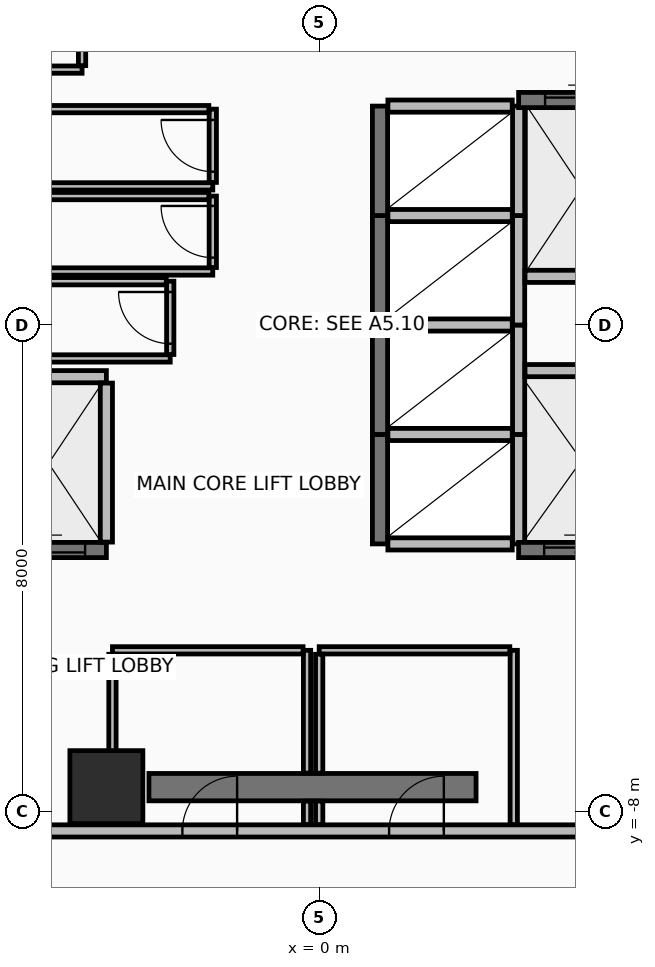
"""IFC4 building model, lengths in metres.
Left out: names, types, materials, properties, quantities, classifications, styles, units other than length and angle.
Written with IfcOpenShell. Run it as: python <this file> out.ifc"""

import sys

from ifc_helpers import new_model, si_unit, direction, frame, frame_2d, origin, origin_2d, place, context, subcontext, project, spatial, rectangle, extrude, element, fill, save


model = new_model("IFC4")
c1 = context("Model", 3, precision=1e-05, world=origin(), true_north=direction((0.0, 1.0)))
c2 = subcontext(c1, "Body", "Model", "MODEL_VIEW")
j1 = project(units=[si_unit("LENGTHUNIT", "METRE"), si_unit("PLANEANGLEUNIT", "RADIAN")], contexts=[c1])
p1 = place(None, origin())
s1 = spatial("IfcSite", under=j1, at=p1, CompositionType="ELEMENT")
p2 = place(p1, origin())
s2 = spatial("IfcBuilding", under=s1, at=p2, CompositionType="ELEMENT")
p3 = place(p2, frame((0.0, 0.0, 196.85)))
s3 = spatial("IfcBuildingStorey", under=s2, at=p3, CompositionType="ELEMENT", Elevation=196.85)
p4 = place(p3, frame((-3.5, -7.6, 0.0), z_axis=(0.0, 0.0, 1.0), x_axis=(1.0, 0.0, 0.0)))
e1 = element("IfcColumn", 1, at=p4, inside=s3, PredefinedType="COLUMN", context=c2, shape_type="SweptSolid", body=[
    extrude(rectangle(XDim=1.2, YDim=1.2, at=origin_2d()), origin(), (0.0, 0.0, 1.0), 3.6),
])
p5 = place(p3, frame((-2.8, -7.6, 0.0), z_axis=(0.0, 0.0, 1.0), x_axis=(1.0, 0.0, 0.0)))
e2 = element("IfcWall", 2, at=p5, inside=s3, PredefinedType="SHEAR", context=c2, shape_type="SweptSolid", body=[
    extrude(rectangle(XDim=5.38, YDim=0.45, at=frame_2d((2.69, 0.0))), origin(), (0.0, 0.0, 1.0), 3.42),
])
p6 = place(p3, frame((-9.62, -8.32, 0.0), z_axis=(0.0, 0.0, 1.0), x_axis=(1.0, 0.0, 0.0)))
e3 = element("IfcWall", 3, at=p6, inside=s3, PredefinedType="PARTITIONING", context=c2, shape_type="SweptSolid", body=[
    extrude(rectangle(XDim=19.24, YDim=0.2, at=frame_2d((9.62, 0.0))), origin(), (0.0, 0.0, 1.0), 2.865),
])
p7 = place(p6, frame((7.37, 0.0, 0.0)))
e4 = element("IfcOpeningElement", 4, at=p7, cuts=e3, PredefinedType="OPENING", context=c2, shape_type="SweptSolid", body=[
    extrude(rectangle(XDim=0.9, YDim=2.1, at=frame_2d((0.45, 1.05))), frame((0.0, 0.11, 0.0), z_axis=(0.0, -1.0, 0.0), x_axis=(1.0, 0.0, 0.0)), (0.0, 0.0, 1.0), 0.22),
])
p8 = place(p6, frame((10.77, 0.0, 0.0)))
e5 = element("IfcOpeningElement", 5, at=p8, cuts=e3, PredefinedType="OPENING", context=c2, shape_type="SweptSolid", body=[
    extrude(rectangle(XDim=0.9, YDim=2.1, at=frame_2d((0.45, 1.05))), frame((0.0, 0.11, 0.0), z_axis=(0.0, -1.0, 0.0), x_axis=(1.0, 0.0, 0.0)), (0.0, 0.0, 1.0), 0.22),
])
p9 = place(p3, frame((1.0, -3.6, 0.0), z_axis=(0.0, 0.0, 1.0), x_axis=(0.0, 1.0, 0.0)))
e6 = element("IfcWall", 6, at=p9, inside=s3, PredefinedType="SHEAR", context=c2, shape_type="SweptSolid", body=[
    extrude(rectangle(XDim=1.8, YDim=0.25, at=frame_2d((0.9, 0.0))), origin(), (0.0, 0.0, 1.0), 3.42),
])
p10 = place(p3, frame((3.28, -3.6, 0.0), z_axis=(0.0, 0.0, 1.0), x_axis=(0.0, 1.0, 0.0)))
e7 = element("IfcWall", 7, at=p10, inside=s3, PredefinedType="PARTITIONING", context=c2, shape_type="SweptSolid", body=[
    extrude(rectangle(XDim=1.8, YDim=0.2, at=frame_2d((0.9, 0.0))), origin(), (0.0, 0.0, 1.0), 3.42),
])
for number, where, z_axis, x_axis in (
    (8, (1.13, -3.6, 0.0), (0.0, 0.0, 1.0), (1.0, 0.0, 0.0)),
    (9, (1.13, -1.8, 0.0), (0.0, 0.0, 1.0), (1.0, 0.0, 0.0)),
):
    element("IfcWall", number, at=place(p3, frame(where, z_axis=z_axis, x_axis=x_axis)), inside=s3, PredefinedType="PARTITIONING", context=c2, shape_type="SweptSolid", body=[
        extrude(rectangle(XDim=2.045, YDim=0.2, at=frame_2d((1.022, 0.0))), origin(), (0.0, 0.0, 1.0), 3.42),
    ])
p11 = place(p3, frame((1.0, -1.8, 0.0), z_axis=(0.0, 0.0, 1.0), x_axis=(0.0, 1.0, 0.0)))
e10 = element("IfcWall", 10, at=p11, inside=s3, PredefinedType="SHEAR", context=c2, shape_type="SweptSolid", body=[
    extrude(rectangle(XDim=1.8, YDim=0.25, at=frame_2d((0.9, 0.0))), origin(), (0.0, 0.0, 1.0), 3.42),
])
p12 = place(p3, frame((3.28, -1.8, 0.0), z_axis=(0.0, 0.0, 1.0), x_axis=(0.0, 1.0, 0.0)))
e11 = element("IfcWall", 11, at=p12, inside=s3, PredefinedType="PARTITIONING", context=c2, shape_type="SweptSolid", body=[
    extrude(rectangle(XDim=1.8, YDim=0.2, at=frame_2d((0.9, 0.0))), origin(), (0.0, 0.0, 1.0), 3.42),
])
p13 = place(p3, frame((1.13, 0.0, 0.0), z_axis=(0.0, 0.0, 1.0), x_axis=(1.0, 0.0, 0.0)))
e12 = element("IfcWall", 12, at=p13, inside=s3, PredefinedType="PARTITIONING", context=c2, shape_type="SweptSolid", body=[
    extrude(rectangle(XDim=2.045, YDim=0.2, at=frame_2d((1.022, 0.0))), origin(), (0.0, 0.0, 1.0), 3.42),
])
p14 = place(p3, frame((1.0, 0.0, 0.0), z_axis=(0.0, 0.0, 1.0), x_axis=(0.0, 1.0, 0.0)))
e13 = element("IfcWall", 13, at=p14, inside=s3, PredefinedType="SHEAR", context=c2, shape_type="SweptSolid", body=[
    extrude(rectangle(XDim=1.8, YDim=0.25, at=frame_2d((0.9, 0.0))), origin(), (0.0, 0.0, 1.0), 3.42),
])
p15 = place(p3, frame((3.28, 0.0, 0.0), z_axis=(0.0, 0.0, 1.0), x_axis=(0.0, 1.0, 0.0)))
e14 = element("IfcWall", 14, at=p15, inside=s3, PredefinedType="PARTITIONING", context=c2, shape_type="SweptSolid", body=[
    extrude(rectangle(XDim=1.8, YDim=0.2, at=frame_2d((0.9, 0.0))), origin(), (0.0, 0.0, 1.0), 3.42),
])
p16 = place(p3, frame((1.13, 1.8, 0.0), z_axis=(0.0, 0.0, 1.0), x_axis=(1.0, 0.0, 0.0)))
e15 = element("IfcWall", 15, at=p16, inside=s3, PredefinedType="PARTITIONING", context=c2, shape_type="SweptSolid", body=[
    extrude(rectangle(XDim=2.045, YDim=0.2, at=frame_2d((1.022, 0.0))), origin(), (0.0, 0.0, 1.0), 3.42),
])
p17 = place(p3, frame((1.0, 1.8, 0.0), z_axis=(0.0, 0.0, 1.0), x_axis=(0.0, 1.0, 0.0)))
e16 = element("IfcWall", 16, at=p17, inside=s3, PredefinedType="SHEAR", context=c2, shape_type="SweptSolid", body=[
    extrude(rectangle(XDim=1.8, YDim=0.25, at=frame_2d((0.9, 0.0))), origin(), (0.0, 0.0, 1.0), 3.42),
])
p18 = place(p3, frame((3.28, 1.8, 0.0), z_axis=(0.0, 0.0, 1.0), x_axis=(0.0, 1.0, 0.0)))
e17 = element("IfcWall", 17, at=p18, inside=s3, PredefinedType="PARTITIONING", context=c2, shape_type="SweptSolid", body=[
    extrude(rectangle(XDim=1.8, YDim=0.2, at=frame_2d((0.9, 0.0))), origin(), (0.0, 0.0, 1.0), 3.42),
])
p19 = place(p3, frame((1.13, 3.6, 0.0), z_axis=(0.0, 0.0, 1.0), x_axis=(1.0, 0.0, 0.0)))
e18 = element("IfcWall", 18, at=p19, inside=s3, PredefinedType="PARTITIONING", context=c2, shape_type="SweptSolid", body=[
    extrude(rectangle(XDim=2.045, YDim=0.2, at=frame_2d((1.022, 0.0))), origin(), (0.0, 0.0, 1.0), 2.715),
])
p20 = place(p3, frame((-5.4, -3.7, 0.0), z_axis=(0.0, 0.0, 1.0), x_axis=(1.0, 0.0, 0.0)))
e19 = element("IfcWall", 19, at=p20, inside=s3, PredefinedType="SHEAR", context=c2, shape_type="SweptSolid", body=[
    extrude(rectangle(XDim=1.9, YDim=0.25, at=frame_2d((0.95, 0.0))), origin(), (0.0, 0.0, 1.0), 3.42),
])
p21 = place(p20, frame((0.35, 0.0, 0.0)))
e20 = element("IfcOpeningElement", 20, at=p21, cuts=e19, PredefinedType="OPENING", context=c2, shape_type="SweptSolid", body=[
    extrude(rectangle(XDim=1.2, YDim=2.2, at=frame_2d((0.6, 1.1))), frame((0.0, 0.135, 0.0), z_axis=(0.0, -1.0, 0.0), x_axis=(1.0, 0.0, 0.0)), (0.0, 0.0, 1.0), 0.27),
])
p22 = place(p3, frame((-5.27, -0.85, 0.0), z_axis=(0.0, 0.0, 1.0), x_axis=(1.0, 0.0, 0.0)))
e21 = element("IfcWall", 21, at=p22, inside=s3, PredefinedType="PARTITIONING", context=c2, shape_type="SweptSolid", body=[
    extrude(rectangle(XDim=1.77, YDim=0.2, at=frame_2d((0.885, 0.0))), origin(), (0.0, 0.0, 1.0), 3.42),
])
p23 = place(p3, frame((-3.5, -3.57, 0.0), z_axis=(0.0, 0.0, 1.0), x_axis=(0.0, 1.0, 0.0)))
e22 = element("IfcWall", 22, at=p23, inside=s3, PredefinedType="PARTITIONING", context=c2, shape_type="SweptSolid", body=[
    extrude(rectangle(XDim=2.615, YDim=0.2, at=frame_2d((1.308, 0.0))), origin(), (0.0, 0.0, 1.0), 3.42),
])
p24 = place(p3, frame((3.28, 3.7, 0.0), z_axis=(0.0, 0.0, 1.0), x_axis=(1.0, 0.0, 0.0)))
e23 = element("IfcWall", 23, at=p24, inside=s3, PredefinedType="SHEAR", context=c2, shape_type="SweptSolid", body=[
    extrude(rectangle(XDim=2.07, YDim=0.25, at=frame_2d((1.035, 0.0))), origin(), (0.0, 0.0, 1.0), 3.42),
])
p25 = place(p24, frame((0.435, 0.0, 0.0)))
e24 = element("IfcOpeningElement", 24, at=p25, cuts=e23, PredefinedType="OPENING", context=c2, shape_type="SweptSolid", body=[
    extrude(rectangle(XDim=1.2, YDim=2.2, at=frame_2d((0.6, 1.1))), frame((0.0, 0.135, 0.0), z_axis=(0.0, -1.0, 0.0), x_axis=(1.0, 0.0, 0.0)), (0.0, 0.0, 1.0), 0.27),
])
p26 = place(p3, frame((3.385, 0.8, 0.0), z_axis=(0.0, 0.0, 1.0), x_axis=(1.0, 0.0, 0.0)))
e25 = element("IfcWall", 25, at=p26, inside=s3, PredefinedType="PARTITIONING", context=c2, shape_type="SweptSolid", body=[
    extrude(rectangle(XDim=1.835, YDim=0.2, at=frame_2d((0.917, 0.0))), origin(), (0.0, 0.0, 1.0), 3.42),
])
p27 = place(p3, frame((3.28, -3.7, 0.0), z_axis=(0.0, 0.0, 1.0), x_axis=(1.0, 0.0, 0.0)))
e26 = element("IfcWall", 26, at=p27, inside=s3, PredefinedType="SHEAR", context=c2, shape_type="SweptSolid", body=[
    extrude(rectangle(XDim=1.94, YDim=0.25, at=frame_2d((0.97, 0.0))), origin(), (0.0, 0.0, 1.0), 3.42),
])
p28 = place(p27, frame((0.42, 0.0, 0.0)))
e27 = element("IfcOpeningElement", 27, at=p28, cuts=e26, PredefinedType="OPENING", context=c2, shape_type="SweptSolid", body=[
    extrude(rectangle(XDim=1.1, YDim=2.2, at=frame_2d((0.55, 1.1))), frame((0.0, 0.135, 0.0), z_axis=(0.0, -1.0, 0.0), x_axis=(1.0, 0.0, 0.0)), (0.0, 0.0, 1.0), 0.27),
])
p29 = place(p3, frame((3.385, -0.75, 0.0), z_axis=(0.0, 0.0, 1.0), x_axis=(1.0, 0.0, 0.0)))
e28 = element("IfcWall", 28, at=p29, inside=s3, PredefinedType="PARTITIONING", context=c2, shape_type="SweptSolid", body=[
    extrude(rectangle(XDim=1.835, YDim=0.2, at=frame_2d((0.917, 0.0))), origin(), (0.0, 0.0, 1.0), 3.42),
])
p30 = place(p3, frame((-5.22, 2.28, 0.0), z_axis=(0.0, 0.0, 1.0), x_axis=(1.0, 0.0, 0.0)))
e29 = element("IfcWall", 29, at=p30, inside=s3, PredefinedType="PARTITIONING", context=c2, shape_type="SweptSolid", body=[
    extrude(rectangle(XDim=3.47, YDim=0.12, at=frame_2d((1.735, 0.0))), origin(), (0.0, 0.0, 1.0), 3.42),
])
p31 = place(p3, frame((-1.75, 2.345, 0.0), z_axis=(0.0, 0.0, 1.0), x_axis=(0.0, 1.0, 0.0)))
e30 = element("IfcWall", 30, at=p31, inside=s3, PredefinedType="PARTITIONING", context=c2, shape_type="SweptSolid", body=[
    extrude(rectangle(XDim=1.205, YDim=0.12, at=frame_2d((0.603, 0.0))), origin(), (0.0, 0.0, 1.0), 3.42),
])
p32 = place(p31, frame((0.177, 0.0, 0.0)))
e31 = element("IfcOpeningElement", 31, at=p32, cuts=e30, PredefinedType="OPENING", context=c2, shape_type="SweptSolid", body=[
    extrude(rectangle(XDim=0.85, YDim=2.1, at=frame_2d((0.425, 1.05))), frame((0.0, 0.07, 0.0), z_axis=(0.0, -1.0, 0.0), x_axis=(1.0, 0.0, 0.0)), (0.0, 0.0, 1.0), 0.14),
])
p33 = place(p3, frame((-1.815, 3.55, 0.0), z_axis=(0.0, 0.0, 1.0), x_axis=(-1.0, 0.0, 0.0)))
e32 = element("IfcWall", 32, at=p33, inside=s3, PredefinedType="PARTITIONING", context=c2, shape_type="SweptSolid", body=[
    extrude(rectangle(XDim=3.405, YDim=0.12, at=frame_2d((1.703, 0.0))), origin(), (0.0, 0.0, 1.0), 3.42),
])
p34 = place(p3, frame((-5.22, 0.88, 0.0), z_axis=(0.0, 0.0, 1.0), x_axis=(1.0, 0.0, 0.0)))
e33 = element("IfcWall", 33, at=p34, inside=s3, PredefinedType="PARTITIONING", context=c2, shape_type="SweptSolid", body=[
    extrude(rectangle(XDim=3.47, YDim=0.12, at=frame_2d((1.735, 0.0))), origin(), (0.0, 0.0, 1.0), 3.42),
])
p35 = place(p3, frame((-1.75, 0.945, 0.0), z_axis=(0.0, 0.0, 1.0), x_axis=(0.0, 1.0, 0.0)))
e34 = element("IfcWall", 34, at=p35, inside=s3, PredefinedType="PARTITIONING", context=c2, shape_type="SweptSolid", body=[
    extrude(rectangle(XDim=1.175, YDim=0.12, at=frame_2d((0.587, 0.0))), origin(), (0.0, 0.0, 1.0), 3.42),
])
p36 = place(p35, frame((0.163, 0.0, 0.0)))
e35 = element("IfcOpeningElement", 35, at=p36, cuts=e34, PredefinedType="OPENING", context=c2, shape_type="SweptSolid", body=[
    extrude(rectangle(XDim=0.85, YDim=2.1, at=frame_2d((0.425, 1.05))), frame((0.0, 0.07, 0.0), z_axis=(0.0, -1.0, 0.0), x_axis=(1.0, 0.0, 0.0)), (0.0, 0.0, 1.0), 0.14),
])
p37 = place(p3, frame((-1.815, 2.12, 0.0), z_axis=(0.0, 0.0, 1.0), x_axis=(-1.0, 0.0, 0.0)))
e36 = element("IfcWall", 36, at=p37, inside=s3, PredefinedType="PARTITIONING", context=c2, shape_type="SweptSolid", body=[
    extrude(rectangle(XDim=3.405, YDim=0.12, at=frame_2d((1.703, 0.0))), origin(), (0.0, 0.0, 1.0), 3.42),
])
p38 = place(p3, frame((-5.22, -0.55, 0.0), z_axis=(0.0, 0.0, 1.0), x_axis=(1.0, 0.0, 0.0)))
e37 = element("IfcWall", 37, at=p38, inside=s3, PredefinedType="PARTITIONING", context=c2, shape_type="SweptSolid", body=[
    extrude(rectangle(XDim=2.77, YDim=0.12, at=frame_2d((1.385, 0.0))), origin(), (0.0, 0.0, 1.0), 3.42),
])
p39 = place(p3, frame((-2.45, -0.485, 0.0), z_axis=(0.0, 0.0, 1.0), x_axis=(0.0, 1.0, 0.0)))
e38 = element("IfcWall", 38, at=p39, inside=s3, PredefinedType="PARTITIONING", context=c2, shape_type="SweptSolid", body=[
    extrude(rectangle(XDim=1.205, YDim=0.12, at=frame_2d((0.603, 0.0))), origin(), (0.0, 0.0, 1.0), 3.42),
])
p40 = place(p39, frame((0.178, 0.0, 0.0)))
e39 = element("IfcOpeningElement", 39, at=p40, cuts=e38, PredefinedType="OPENING", context=c2, shape_type="SweptSolid", body=[
    extrude(rectangle(XDim=0.85, YDim=2.1, at=frame_2d((0.425, 1.05))), frame((0.0, 0.07, 0.0), z_axis=(0.0, -1.0, 0.0), x_axis=(1.0, 0.0, 0.0)), (0.0, 0.0, 1.0), 0.14),
])
p41 = place(p3, frame((-2.515, 0.72, 0.0), z_axis=(0.0, 0.0, 1.0), x_axis=(-1.0, 0.0, 0.0)))
e40 = element("IfcWall", 40, at=p41, inside=s3, PredefinedType="PARTITIONING", context=c2, shape_type="SweptSolid", body=[
    extrude(rectangle(XDim=2.705, YDim=0.12, at=frame_2d((1.353, 0.0))), origin(), (0.0, 0.0, 1.0), 3.42),
])
p42 = place(p3, frame((-0.2, -8.215, 0.0), z_axis=(0.0, 0.0, 1.0), x_axis=(0.0, 1.0, 0.0)))
e41 = element("IfcWall", 41, at=p42, inside=s3, PredefinedType="PARTITIONING", context=c2, shape_type="SweptSolid", body=[
    extrude(rectangle(XDim=0.385, YDim=0.12, at=frame_2d((0.192, 0.0))), origin(), (0.0, 0.0, 1.0), 2.715),
])
p43 = place(p3, frame((-0.2, -7.37, 0.0), z_axis=(0.0, 0.0, 1.0), x_axis=(0.0, 1.0, 0.0)))
e42 = element("IfcWall", 42, at=p43, inside=s3, PredefinedType="PARTITIONING", context=c2, shape_type="SweptSolid", body=[
    extrude(rectangle(XDim=2.02, YDim=0.12, at=frame_2d((1.01, 0.0))), origin(), (0.0, 0.0, 1.0), 2.715),
])
p44 = place(p3, frame((-0.265, -5.35, 0.0), z_axis=(0.0, 0.0, 1.0), x_axis=(-1.0, 0.0, 0.0)))
e43 = element("IfcWall", 43, at=p44, inside=s3, PredefinedType="PARTITIONING", context=c2, shape_type="SweptSolid", body=[
    extrude(rectangle(XDim=3.135, YDim=0.12, at=frame_2d((1.567, 0.0))), origin(), (0.0, 0.0, 1.0), 2.715),
])
p45 = place(p3, frame((-3.4, -5.415, 0.0), z_axis=(0.0, 0.0, 1.0), x_axis=(0.0, -1.0, 0.0)))
e44 = element("IfcWall", 44, at=p45, inside=s3, PredefinedType="PARTITIONING", context=c2, shape_type="SweptSolid", body=[
    extrude(rectangle(XDim=2.8, YDim=0.12, at=frame_2d((1.4, 0.0))), origin(), (0.0, 0.0, 1.0), 2.715),
])
p46 = place(p3, frame((3.2, -8.215, 0.0), z_axis=(0.0, 0.0, 1.0), x_axis=(0.0, 1.0, 0.0)))
e45 = element("IfcWall", 45, at=p46, inside=s3, PredefinedType="PARTITIONING", context=c2, shape_type="SweptSolid", body=[
    extrude(rectangle(XDim=2.865, YDim=0.12, at=frame_2d((1.433, 0.0))), origin(), (0.0, 0.0, 1.0), 2.715),
])
p47 = place(p3, frame((3.135, -5.35, 0.0), z_axis=(0.0, 0.0, 1.0), x_axis=(-1.0, 0.0, 0.0)))
e46 = element("IfcWall", 46, at=p47, inside=s3, PredefinedType="PARTITIONING", context=c2, shape_type="SweptSolid", body=[
    extrude(rectangle(XDim=3.135, YDim=0.12, at=frame_2d((1.567, 0.0))), origin(), (0.0, 0.0, 1.0), 3.42),
])
p48 = place(p3, frame((0.0, -5.415, 0.0), z_axis=(0.0, 0.0, 1.0), x_axis=(0.0, -1.0, 0.0)))
e47 = element("IfcWall", 47, at=p48, inside=s3, PredefinedType="PARTITIONING", context=c2, shape_type="SweptSolid", body=[
    extrude(rectangle(XDim=1.955, YDim=0.12, at=frame_2d((0.978, 0.0))), origin(), (0.0, 0.0, 1.0), 2.715),
])
p49 = place(p3, frame((0.0, -7.83, 0.0), z_axis=(0.0, 0.0, 1.0), x_axis=(0.0, -1.0, 0.0)))
e48 = element("IfcWall", 48, at=p49, inside=s3, PredefinedType="PARTITIONING", context=c2, shape_type="SweptSolid", body=[
    extrude(rectangle(XDim=0.385, YDim=0.12, at=frame_2d((0.192, 0.0))), origin(), (0.0, 0.0, 1.0), 2.715),
])
p50 = place(p3, frame((-7.8, 4.2, 0.0), z_axis=(0.0, 0.0, 1.0), x_axis=(1.0, 0.0, 0.0)))
e49 = element("IfcWall", 49, at=p50, inside=s3, PredefinedType="PARTITIONING", context=c2, shape_type="SweptSolid", body=[
    extrude(rectangle(XDim=3.9, YDim=0.12, at=frame_2d((1.95, 0.0))), origin(), (0.0, 0.0, 1.0), 3.42),
])
p51 = place(p3, frame((-3.9, 4.265, 0.0), z_axis=(0.0, 0.0, 1.0), x_axis=(0.0, 1.0, 0.0)))
e50 = element("IfcWall", 50, at=p51, inside=s3, PredefinedType="PARTITIONING", context=c2, shape_type="SweptSolid", body=[
    extrude(rectangle(XDim=3.95, YDim=0.12, at=frame_2d((1.975, 0.0))), origin(), (0.0, 0.0, 1.0), 2.715),
])
p52 = place(p21, origin())
e51 = element("IfcDoor", 51, at=p52, inside=s3, OperationType="SLIDING_TO_RIGHT", PredefinedType="DOOR", context=c2, shape_type="SweptSolid", body=[
    extrude(rectangle(XDim=1.2, YDim=2.2, at=frame_2d((0.6, 1.1))), frame((0.0, 0.025, 0.0), z_axis=(0.0, -1.0, 0.0), x_axis=(1.0, 0.0, 0.0)), (0.0, 0.0, 1.0), 0.05),
])
fill(e20, e51)
p53 = place(p25, origin())
e52 = element("IfcDoor", 52, at=p53, inside=s3, OperationType="SLIDING_TO_RIGHT", PredefinedType="DOOR", context=c2, shape_type="SweptSolid", body=[
    extrude(rectangle(XDim=1.2, YDim=2.2, at=frame_2d((0.6, 1.1))), frame((0.0, 0.025, 0.0), z_axis=(0.0, -1.0, 0.0), x_axis=(1.0, 0.0, 0.0)), (0.0, 0.0, 1.0), 0.05),
])
fill(e24, e52)
p54 = place(p28, origin())
e53 = element("IfcDoor", 53, at=p54, inside=s3, OperationType="SLIDING_TO_LEFT", PredefinedType="DOOR", context=c2, shape_type="SweptSolid", body=[
    extrude(rectangle(XDim=1.1, YDim=2.2, at=frame_2d((0.55, 1.1))), frame((0.0, 0.025, 0.0), z_axis=(0.0, -1.0, 0.0), x_axis=(1.0, 0.0, 0.0)), (0.0, 0.0, 1.0), 0.05),
])
fill(e27, e53)
p55 = place(p32, frame((0.85, 0.0, 0.0), z_axis=(0.0, 0.0, 1.0), x_axis=(-1.0, 0.0, 0.0)))
e54 = element("IfcDoor", 54, at=p55, inside=s3, OperationType="SINGLE_SWING_RIGHT", PredefinedType="DOOR", context=c2, shape_type="SweptSolid", body=[
    extrude(rectangle(XDim=0.85, YDim=2.1, at=frame_2d((0.425, 1.05))), frame((0.0, 0.025, 0.0), z_axis=(0.0, -1.0, 0.0), x_axis=(1.0, 0.0, 0.0)), (0.0, 0.0, 1.0), 0.05),
])
fill(e31, e54)
p56 = place(p36, frame((0.85, 0.0, 0.0), z_axis=(0.0, 0.0, 1.0), x_axis=(-1.0, 0.0, 0.0)))
e55 = element("IfcDoor", 55, at=p56, inside=s3, OperationType="SINGLE_SWING_RIGHT", PredefinedType="DOOR", context=c2, shape_type="SweptSolid", body=[
    extrude(rectangle(XDim=0.85, YDim=2.1, at=frame_2d((0.425, 1.05))), frame((0.0, 0.025, 0.0), z_axis=(0.0, -1.0, 0.0), x_axis=(1.0, 0.0, 0.0)), (0.0, 0.0, 1.0), 0.05),
])
fill(e35, e55)
p57 = place(p40, frame((0.85, 0.0, 0.0), z_axis=(0.0, 0.0, 1.0), x_axis=(-1.0, 0.0, 0.0)))
e56 = element("IfcDoor", 56, at=p57, inside=s3, OperationType="SINGLE_SWING_RIGHT", PredefinedType="DOOR", context=c2, shape_type="SweptSolid", body=[
    extrude(rectangle(XDim=0.85, YDim=2.1, at=frame_2d((0.425, 1.05))), frame((0.0, 0.025, 0.0), z_axis=(0.0, -1.0, 0.0), x_axis=(1.0, 0.0, 0.0)), (0.0, 0.0, 1.0), 0.05),
])
fill(e39, e56)
p58 = place(p7, frame((0.9, 0.0, 0.0), z_axis=(0.0, 0.0, 1.0), x_axis=(-1.0, 0.0, 0.0)))
e57 = element("IfcDoor", 57, at=p58, inside=s3, OperationType="SINGLE_SWING_LEFT", PredefinedType="DOOR", context=c2, shape_type="SweptSolid", body=[
    extrude(rectangle(XDim=0.9, YDim=2.1, at=frame_2d((0.45, 1.05))), frame((0.0, 0.025, 0.0), z_axis=(0.0, -1.0, 0.0), x_axis=(1.0, 0.0, 0.0)), (0.0, 0.0, 1.0), 0.05),
])
fill(e4, e57)
p59 = place(p8, frame((0.9, 0.0, 0.0), z_axis=(0.0, 0.0, 1.0), x_axis=(-1.0, 0.0, 0.0)))
e58 = element("IfcDoor", 58, at=p59, inside=s3, OperationType="SINGLE_SWING_LEFT", PredefinedType="DOOR", context=c2, shape_type="SweptSolid", body=[
    extrude(rectangle(XDim=0.9, YDim=2.1, at=frame_2d((0.45, 1.05))), frame((0.0, 0.025, 0.0), z_axis=(0.0, -1.0, 0.0), x_axis=(1.0, 0.0, 0.0)), (0.0, 0.0, 1.0), 0.05),
])
fill(e5, e58)
save(model, sys.argv[1])
